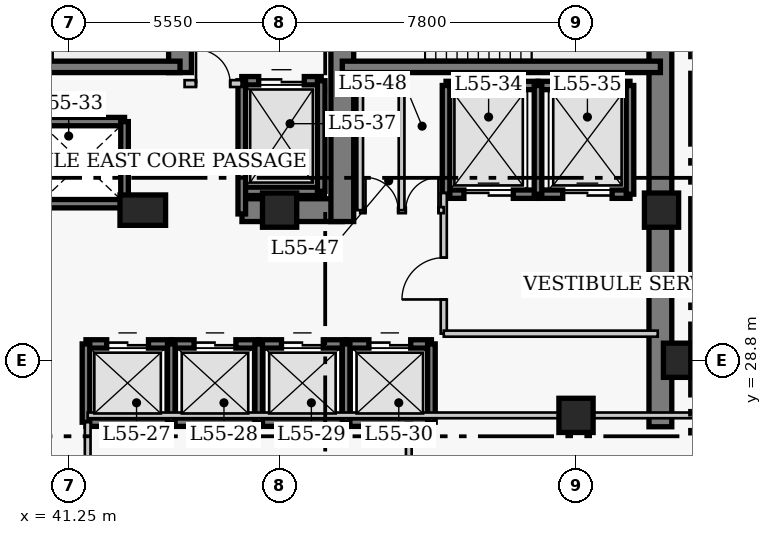
"""IFC4 building model, lengths in metres.
Left out: names, types, materials, properties, quantities, classifications, styles, units other than length and angle.
Written with IfcOpenShell. Run it as: python <this file> out.ifc"""

import sys

from ifc_helpers import new_model, si_unit, direction, frame, frame_2d, origin, origin_2d, place, context, subcontext, project, spatial, rectangle, extrude, element, fill, save


model = new_model("IFC4")
c1 = context("Model", 3, precision=1e-05, world=origin(), true_north=direction((0.0, 1.0)))
c2 = subcontext(c1, "Body", "Model", "MODEL_VIEW")
j1 = project(units=[si_unit("LENGTHUNIT", "METRE"), si_unit("PLANEANGLEUNIT", "RADIAN")], contexts=[c1])
p1 = place(None, origin())
s1 = spatial("IfcSite", under=j1, at=p1, CompositionType="ELEMENT")
p2 = place(p1, origin())
s2 = spatial("IfcBuilding", under=s1, at=p2, CompositionType="ELEMENT")
p3 = place(p2, frame((0.0, 0.0, 220.2)))
s3 = spatial("IfcBuildingStorey", under=s2, at=p3, CompositionType="ELEMENT", Elevation=220.2)
p4 = place(p3, frame((56.82, 27.05, 0.0), z_axis=(0.0, 0.0, 1.0), x_axis=(0.0, 1.0, 0.0)))
e1 = element("IfcWall", 1, at=p4, inside=s3, PredefinedType="SHEAR", context=c2, shape_type="SweptSolid", body=[
    extrude(rectangle(XDim=13.57, YDim=0.6, at=frame_2d((6.785, 0.0))), origin(), (0.0, 0.0, 1.0), 3.9),
])
p5 = place(p3, frame((45.81, 32.75, 0.0), z_axis=(0.0, 0.0, 1.0), x_axis=(1.0, 0.0, 0.0)))
e2 = element("IfcWall", 2, at=p5, inside=s3, PredefinedType="SHEAR", context=c2, shape_type="SweptSolid", body=[
    extrude(rectangle(XDim=2.64, YDim=0.6, at=frame_2d((1.32, 0.0))), origin(), (0.0, 0.0, 1.0), 3.9),
])
p6 = place(p3, frame((44.18, 36.37, 0.0), z_axis=(0.0, 0.0, 1.0), x_axis=(0.0, 1.0, 0.0)))
e3 = element("IfcWall", 3, at=p6, inside=s3, PredefinedType="SHEAR", context=c2, shape_type="SweptSolid", body=[
    extrude(rectangle(XDim=3.95, YDim=0.6, at=frame_2d((1.975, 0.0))), origin(), (0.0, 0.0, 1.0), 3.9),
])
p7 = place(p3, frame((48.45, 32.45, 0.0), z_axis=(0.0, 0.0, 1.0), x_axis=(0.0, 1.0, 0.0)))
e4 = element("IfcWall", 4, at=p7, inside=s3, PredefinedType="SHEAR", context=c2, shape_type="SweptSolid", body=[
    extrude(rectangle(XDim=7.87, YDim=0.6, at=frame_2d((3.935, 0.0))), origin(), (0.0, 0.0, 1.0), 3.9),
])
p8 = place(p7, frame((5.75, 0.0, 0.0)))
e5 = element("IfcOpeningElement", 5, at=p8, cuts=e4, PredefinedType="OPENING", context=c2, shape_type="SweptSolid", body=[
    extrude(rectangle(XDim=1.1, YDim=2.15, at=frame_2d((0.55, 1.075))), frame((0.0, 0.31, 0.0), z_axis=(0.0, -1.0, 0.0), x_axis=(1.0, 0.0, 0.0)), (0.0, 0.0, 1.0), 0.62),
])
p9 = place(p3, frame((35.85, 36.52, 0.0), z_axis=(0.0, 0.0, 1.0), x_axis=(1.0, 0.0, 0.0)))
e6 = element("IfcWall", 6, at=p9, inside=s3, PredefinedType="SHEAR", context=c2, shape_type="SweptSolid", body=[
    extrude(rectangle(XDim=8.33, YDim=0.3, at=frame_2d((4.165, 0.0))), origin(), (0.0, 0.0, 1.0), 3.9),
])
p10 = place(p3, frame((48.45, 36.52, 0.0), z_axis=(0.0, 0.0, 1.0), x_axis=(1.0, 0.0, 0.0)))
e7 = element("IfcWall", 7, at=p10, inside=s3, PredefinedType="SHEAR", context=c2, shape_type="SweptSolid", body=[
    extrude(rectangle(XDim=8.37, YDim=0.3, at=frame_2d((4.185, 0.0))), origin(), (0.0, 0.0, 1.0), 3.9),
])
p11 = place(p3, frame((57.35, 28.8, 0.0), z_axis=(0.0, 0.0, 1.0), x_axis=(1.0, 0.0, 0.0)))
e8 = element("IfcColumn", 8, at=p11, inside=s3, PredefinedType="COLUMN", context=c2, shape_type="SweptSolid", body=[
    extrude(rectangle(XDim=0.9, YDim=0.9, at=origin_2d()), origin(), (0.0, 0.0, 1.0), 3.9),
])
p12 = place(p3, frame((43.2, 32.75, 0.0), z_axis=(0.0, 0.0, 1.0), x_axis=(1.0, 0.0, 0.0)))
e9 = element("IfcColumn", 9, at=p12, inside=s3, PredefinedType="COLUMN", context=c2, shape_type="SweptSolid", body=[
    extrude(rectangle(XDim=1.2, YDim=0.8, at=origin_2d()), origin(), (0.0, 0.0, 1.0), 3.9),
])
for number, where, z_axis, x_axis in (
    (10, (46.8, 32.75, 0.0), (0.0, 0.0, 1.0), (1.0, 0.0, 0.0)),
    (11, (54.6, 27.35, 0.0), (0.0, 0.0, 1.0), (1.0, 0.0, 0.0)),
    (12, (56.85, 32.75, 0.0), (0.0, 0.0, 1.0), (1.0, 0.0, 0.0)),
):
    element("IfcColumn", number, at=place(p3, frame(where, z_axis=z_axis, x_axis=x_axis)), inside=s3, PredefinedType="COLUMN", context=c2, shape_type="SweptSolid", body=[
        extrude(rectangle(XDim=0.9, YDim=0.9, at=origin_2d()), origin(), (0.0, 0.0, 1.0), 3.9),
    ])
p13 = place(p3, frame((41.705, 29.23, 0.0), z_axis=(0.0, 0.0, 1.0), x_axis=(1.0, 0.0, 0.0)))
e13 = element("IfcWall", 13, at=p13, inside=s3, PredefinedType="SHEAR", context=c2, shape_type="SweptSolid", body=[
    extrude(rectangle(XDim=2.245, YDim=0.22, at=frame_2d((1.123, 0.0))), origin(), (0.0, 0.0, 1.0), 3.9),
])
p14 = place(p13, frame((0.545, 0.0, 0.0)))
e14 = element("IfcOpeningElement", 14, at=p14, cuts=e13, PredefinedType="OPENING", context=c2, shape_type="SweptSolid", body=[
    extrude(rectangle(XDim=1.1, YDim=2.15, at=frame_2d((0.55, 1.075))), frame((0.0, 0.12, 0.0), z_axis=(0.0, -1.0, 0.0), x_axis=(1.0, 0.0, 0.0)), (0.0, 0.0, 1.0), 0.24),
])
p15 = place(p3, frame((41.705, 27.17, 0.0), z_axis=(0.0, 0.0, 1.0), x_axis=(1.0, 0.0, 0.0)))
e15 = element("IfcWall", 15, at=p15, inside=s3, PredefinedType="SHEAR", context=c2, shape_type="SweptSolid", body=[
    extrude(rectangle(XDim=2.245, YDim=0.22, at=frame_2d((1.123, 0.0))), origin(), (0.0, 0.0, 1.0), 3.9),
])
p16 = place(p3, frame((41.705, 27.17, 0.0), z_axis=(0.0, 0.0, 1.0), x_axis=(0.0, 1.0, 0.0)))
e16 = element("IfcWall", 16, at=p16, inside=s3, PredefinedType="SHEAR", context=c2, shape_type="SweptSolid", body=[
    extrude(rectangle(XDim=2.06, YDim=0.2, at=frame_2d((1.03, 0.0))), origin(), (0.0, 0.0, 1.0), 3.9),
])
p17 = place(p3, frame((43.95, 29.23, 0.0), z_axis=(0.0, 0.0, 1.0), x_axis=(1.0, 0.0, 0.0)))
e17 = element("IfcWall", 17, at=p17, inside=s3, PredefinedType="SHEAR", context=c2, shape_type="SweptSolid", body=[
    extrude(rectangle(XDim=2.3, YDim=0.22, at=frame_2d((1.15, 0.0))), origin(), (0.0, 0.0, 1.0), 3.9),
])
p18 = place(p17, frame((0.6, 0.0, 0.0)))
e18 = element("IfcOpeningElement", 18, at=p18, cuts=e17, PredefinedType="OPENING", context=c2, shape_type="SweptSolid", body=[
    extrude(rectangle(XDim=1.1, YDim=2.15, at=frame_2d((0.55, 1.075))), frame((0.0, 0.12, 0.0), z_axis=(0.0, -1.0, 0.0), x_axis=(1.0, 0.0, 0.0)), (0.0, 0.0, 1.0), 0.24),
])
p19 = place(p3, frame((43.95, 27.17, 0.0), z_axis=(0.0, 0.0, 1.0), x_axis=(1.0, 0.0, 0.0)))
e19 = element("IfcWall", 19, at=p19, inside=s3, PredefinedType="SHEAR", context=c2, shape_type="SweptSolid", body=[
    extrude(rectangle(XDim=2.3, YDim=0.22, at=frame_2d((1.15, 0.0))), origin(), (0.0, 0.0, 1.0), 3.9),
])
p20 = place(p3, frame((43.95, 27.17, 0.0), z_axis=(0.0, 0.0, 1.0), x_axis=(0.0, 1.0, 0.0)))
e20 = element("IfcWall", 20, at=p20, inside=s3, PredefinedType="SHEAR", context=c2, shape_type="SweptSolid", body=[
    extrude(rectangle(XDim=2.06, YDim=0.2, at=frame_2d((1.03, 0.0))), origin(), (0.0, 0.0, 1.0), 3.9),
])
p21 = place(p3, frame((46.25, 29.23, 0.0), z_axis=(0.0, 0.0, 1.0), x_axis=(1.0, 0.0, 0.0)))
e21 = element("IfcWall", 21, at=p21, inside=s3, PredefinedType="SHEAR", context=c2, shape_type="SweptSolid", body=[
    extrude(rectangle(XDim=2.3, YDim=0.22, at=frame_2d((1.15, 0.0))), origin(), (0.0, 0.0, 1.0), 3.9),
])
p22 = place(p21, frame((0.6, 0.0, 0.0)))
e22 = element("IfcOpeningElement", 22, at=p22, cuts=e21, PredefinedType="OPENING", context=c2, shape_type="SweptSolid", body=[
    extrude(rectangle(XDim=1.1, YDim=2.15, at=frame_2d((0.55, 1.075))), frame((0.0, 0.12, 0.0), z_axis=(0.0, -1.0, 0.0), x_axis=(1.0, 0.0, 0.0)), (0.0, 0.0, 1.0), 0.24),
])
p23 = place(p3, frame((46.25, 27.17, 0.0), z_axis=(0.0, 0.0, 1.0), x_axis=(1.0, 0.0, 0.0)))
e23 = element("IfcWall", 23, at=p23, inside=s3, PredefinedType="SHEAR", context=c2, shape_type="SweptSolid", body=[
    extrude(rectangle(XDim=2.3, YDim=0.22, at=frame_2d((1.15, 0.0))), origin(), (0.0, 0.0, 1.0), 3.9),
])
p24 = place(p3, frame((46.25, 27.17, 0.0), z_axis=(0.0, 0.0, 1.0), x_axis=(0.0, 1.0, 0.0)))
e24 = element("IfcWall", 24, at=p24, inside=s3, PredefinedType="SHEAR", context=c2, shape_type="SweptSolid", body=[
    extrude(rectangle(XDim=2.06, YDim=0.2, at=frame_2d((1.03, 0.0))), origin(), (0.0, 0.0, 1.0), 3.9),
])
p25 = place(p3, frame((48.55, 29.23, 0.0), z_axis=(0.0, 0.0, 1.0), x_axis=(1.0, 0.0, 0.0)))
e25 = element("IfcWall", 25, at=p25, inside=s3, PredefinedType="SHEAR", context=c2, shape_type="SweptSolid", body=[
    extrude(rectangle(XDim=2.245, YDim=0.22, at=frame_2d((1.123, 0.0))), origin(), (0.0, 0.0, 1.0), 3.9),
])
p26 = place(p25, frame((0.6, 0.0, 0.0)))
e26 = element("IfcOpeningElement", 26, at=p26, cuts=e25, PredefinedType="OPENING", context=c2, shape_type="SweptSolid", body=[
    extrude(rectangle(XDim=1.1, YDim=2.15, at=frame_2d((0.55, 1.075))), frame((0.0, 0.12, 0.0), z_axis=(0.0, -1.0, 0.0), x_axis=(1.0, 0.0, 0.0)), (0.0, 0.0, 1.0), 0.24),
])
p27 = place(p3, frame((48.55, 27.17, 0.0), z_axis=(0.0, 0.0, 1.0), x_axis=(1.0, 0.0, 0.0)))
e27 = element("IfcWall", 27, at=p27, inside=s3, PredefinedType="SHEAR", context=c2, shape_type="SweptSolid", body=[
    extrude(rectangle(XDim=2.245, YDim=0.22, at=frame_2d((1.123, 0.0))), origin(), (0.0, 0.0, 1.0), 3.9),
])
for number, where, z_axis, x_axis in (
    (28, (48.55, 27.17, 0.0), (0.0, 0.0, 1.0), (0.0, 1.0, 0.0)),
    (29, (50.795, 27.17, 0.0), (0.0, 0.0, 1.0), (0.0, 1.0, 0.0)),
):
    element("IfcWall", number, at=place(p3, frame(where, z_axis=z_axis, x_axis=x_axis)), inside=s3, PredefinedType="SHEAR", context=c2, shape_type="SweptSolid", body=[
        extrude(rectangle(XDim=2.06, YDim=0.2, at=frame_2d((1.03, 0.0))), origin(), (0.0, 0.0, 1.0), 3.9),
    ])
for number, where, z_axis, x_axis in (
    (30, (40.4, 35.08, 0.0), (0.0, 0.0, 1.0), (1.0, 0.0, 0.0)),
    (31, (40.4, 32.92, 0.0), (0.0, 0.0, 1.0), (1.0, 0.0, 0.0)),
):
    element("IfcWall", number, at=place(p3, frame(where, z_axis=z_axis, x_axis=x_axis)), inside=s3, PredefinedType="SHEAR", context=c2, shape_type="SweptSolid", body=[
        extrude(rectangle(XDim=2.32, YDim=0.22, at=frame_2d((1.16, 0.0))), origin(), (0.0, 0.0, 1.0), 3.9),
    ])
p28 = place(p3, frame((42.72, 32.92, 0.0), z_axis=(0.0, 0.0, 1.0), x_axis=(0.0, 1.0, 0.0)))
e32 = element("IfcWall", 32, at=p28, inside=s3, PredefinedType="SHEAR", context=c2, shape_type="SweptSolid", body=[
    extrude(rectangle(XDim=2.16, YDim=0.2, at=frame_2d((1.08, 0.0))), origin(), (0.0, 0.0, 1.0), 3.9),
])
p29 = place(p3, frame((51.18, 36.03, 0.0), z_axis=(0.0, 0.0, 1.0), x_axis=(1.0, 0.0, 0.0)))
e33 = element("IfcWall", 33, at=p29, inside=s3, PredefinedType="SHEAR", context=c2, shape_type="SweptSolid", body=[
    extrude(rectangle(XDim=2.42, YDim=0.22, at=frame_2d((1.21, 0.0))), origin(), (0.0, 0.0, 1.0), 3.9),
])
p30 = place(p3, frame((51.18, 33.17, 0.0), z_axis=(0.0, 0.0, 1.0), x_axis=(1.0, 0.0, 0.0)))
e34 = element("IfcWall", 34, at=p30, inside=s3, PredefinedType="SHEAR", context=c2, shape_type="SweptSolid", body=[
    extrude(rectangle(XDim=2.42, YDim=0.22, at=frame_2d((1.21, 0.0))), origin(), (0.0, 0.0, 1.0), 3.9),
])
p31 = place(p30, frame((0.47, 0.0, 0.0)))
e35 = element("IfcOpeningElement", 35, at=p31, cuts=e34, PredefinedType="OPENING", context=c2, shape_type="SweptSolid", body=[
    extrude(rectangle(XDim=1.3, YDim=2.15, at=frame_2d((0.65, 1.075))), frame((0.0, 0.12, 0.0), z_axis=(0.0, -1.0, 0.0), x_axis=(1.0, 0.0, 0.0)), (0.0, 0.0, 1.0), 0.24),
])
p32 = place(p3, frame((51.18, 33.17, 0.0), z_axis=(0.0, 0.0, 1.0), x_axis=(0.0, 1.0, 0.0)))
e36 = element("IfcWall", 36, at=p32, inside=s3, PredefinedType="SHEAR", context=c2, shape_type="SweptSolid", body=[
    extrude(rectangle(XDim=2.86, YDim=0.2, at=frame_2d((1.43, 0.0))), origin(), (0.0, 0.0, 1.0), 3.9),
])
p33 = place(p3, frame((53.6, 36.03, 0.0), z_axis=(0.0, 0.0, 1.0), x_axis=(1.0, 0.0, 0.0)))
e37 = element("IfcWall", 37, at=p33, inside=s3, PredefinedType="SHEAR", context=c2, shape_type="SweptSolid", body=[
    extrude(rectangle(XDim=2.42, YDim=0.22, at=frame_2d((1.21, 0.0))), origin(), (0.0, 0.0, 1.0), 3.9),
])
p34 = place(p3, frame((53.6, 33.17, 0.0), z_axis=(0.0, 0.0, 1.0), x_axis=(1.0, 0.0, 0.0)))
e38 = element("IfcWall", 38, at=p34, inside=s3, PredefinedType="SHEAR", context=c2, shape_type="SweptSolid", body=[
    extrude(rectangle(XDim=2.42, YDim=0.22, at=frame_2d((1.21, 0.0))), origin(), (0.0, 0.0, 1.0), 3.9),
])
p35 = place(p34, frame((0.65, 0.0, 0.0)))
e39 = element("IfcOpeningElement", 39, at=p35, cuts=e38, PredefinedType="OPENING", context=c2, shape_type="SweptSolid", body=[
    extrude(rectangle(XDim=1.3, YDim=2.15, at=frame_2d((0.65, 1.075))), frame((0.0, 0.12, 0.0), z_axis=(0.0, -1.0, 0.0), x_axis=(1.0, 0.0, 0.0)), (0.0, 0.0, 1.0), 0.24),
])
for number, where, z_axis, x_axis in (
    (40, (53.6, 33.17, 0.0), (0.0, 0.0, 1.0), (0.0, 1.0, 0.0)),
    (41, (56.02, 33.17, 0.0), (0.0, 0.0, 1.0), (0.0, 1.0, 0.0)),
):
    element("IfcWall", number, at=place(p3, frame(where, z_axis=z_axis, x_axis=x_axis)), inside=s3, PredefinedType="SHEAR", context=c2, shape_type="SweptSolid", body=[
        extrude(rectangle(XDim=2.86, YDim=0.2, at=frame_2d((1.43, 0.0))), origin(), (0.0, 0.0, 1.0), 3.9),
    ])
p36 = place(p3, frame((45.805, 36.155, 0.0), z_axis=(0.0, 0.0, 1.0), x_axis=(1.0, 0.0, 0.0)))
e42 = element("IfcWall", 42, at=p36, inside=s3, PredefinedType="SHEAR", context=c2, shape_type="SweptSolid", body=[
    extrude(rectangle(XDim=2.09, YDim=0.22, at=frame_2d((1.045, 0.0))), origin(), (0.0, 0.0, 1.0), 3.9),
])
p37 = place(p36, frame((0.445, 0.0, 0.0)))
e43 = element("IfcOpeningElement", 43, at=p37, cuts=e42, PredefinedType="OPENING", context=c2, shape_type="SweptSolid", body=[
    extrude(rectangle(XDim=1.2, YDim=2.15, at=frame_2d((0.6, 1.075))), frame((0.0, 0.12, 0.0), z_axis=(0.0, -1.0, 0.0), x_axis=(1.0, 0.0, 0.0)), (0.0, 0.0, 1.0), 0.24),
])
p38 = place(p3, frame((45.805, 33.245, 0.0), z_axis=(0.0, 0.0, 1.0), x_axis=(1.0, 0.0, 0.0)))
e44 = element("IfcWall", 44, at=p38, inside=s3, PredefinedType="SHEAR", context=c2, shape_type="SweptSolid", body=[
    extrude(rectangle(XDim=2.09, YDim=0.22, at=frame_2d((1.045, 0.0))), origin(), (0.0, 0.0, 1.0), 3.9),
])
p39 = place(p3, frame((45.805, 32.65, 0.0), z_axis=(0.0, 0.0, 1.0), x_axis=(0.0, 1.0, 0.0)))
e45 = element("IfcWall", 45, at=p39, inside=s3, PredefinedType="SHEAR", context=c2, shape_type="SweptSolid", body=[
    extrude(rectangle(XDim=3.505, YDim=0.2, at=frame_2d((1.752, 0.0))), origin(), (0.0, 0.0, 1.0), 3.9),
])
p40 = place(p3, frame((47.895, 33.245, 0.0), z_axis=(0.0, 0.0, 1.0), x_axis=(0.0, 1.0, 0.0)))
e46 = element("IfcWall", 46, at=p40, inside=s3, PredefinedType="SHEAR", context=c2, shape_type="SweptSolid", body=[
    extrude(rectangle(XDim=2.91, YDim=0.2, at=frame_2d((1.455, 0.0))), origin(), (0.0, 0.0, 1.0), 3.9),
])
p41 = place(p3, frame((44.3, 36.08, 0.0), z_axis=(0.0, 0.0, 1.0), x_axis=(1.0, 0.0, 0.0)))
e47 = element("IfcWall", 47, at=p41, inside=s3, PredefinedType="PARTITIONING", context=c2, shape_type="SweptSolid", body=[
    extrude(rectangle(XDim=1.5, YDim=0.18, at=frame_2d((0.75, 0.0))), origin(), (0.0, 0.0, 1.0), 3.65),
])
p42 = place(p41, frame((0.3, 0.0, 0.0)))
e48 = element("IfcOpeningElement", 48, at=p42, cuts=e47, PredefinedType="OPENING", context=c2, shape_type="SweptSolid", body=[
    extrude(rectangle(XDim=0.9, YDim=2.15, at=frame_2d((0.45, 1.075))), frame((0.0, 0.1, 0.0), z_axis=(0.0, -1.0, 0.0), x_axis=(1.0, 0.0, 0.0)), (0.0, 0.0, 1.0), 0.2),
])
p43 = place(p3, frame((51.12, 29.5, 0.0), z_axis=(0.0, 0.0, 1.0), x_axis=(0.0, 1.0, 0.0)))
e49 = element("IfcWall", 49, at=p43, inside=s3, PredefinedType="PARTITIONING", context=c2, shape_type="SweptSolid", body=[
    extrude(rectangle(XDim=3.7, YDim=0.16, at=frame_2d((1.85, 0.0))), origin(), (0.0, 0.0, 1.0), 3.65),
])
p44 = place(p43, frame((0.9, 0.0, 0.0)))
e50 = element("IfcOpeningElement", 50, at=p44, cuts=e49, PredefinedType="OPENING", context=c2, shape_type="SweptSolid", body=[
    extrude(rectangle(XDim=1.1, YDim=2.15, at=frame_2d((0.55, 1.075))), frame((0.0, 0.09, 0.0), z_axis=(0.0, -1.0, 0.0), x_axis=(1.0, 0.0, 0.0)), (0.0, 0.0, 1.0), 0.18),
])
p45 = place(p3, frame((51.12, 29.5, 0.0), z_axis=(0.0, 0.0, 1.0), x_axis=(1.0, 0.0, 0.0)))
e51 = element("IfcWall", 51, at=p45, inside=s3, PredefinedType="PARTITIONING", context=c2, shape_type="SweptSolid", body=[
    extrude(rectangle(XDim=5.63, YDim=0.16, at=frame_2d((2.815, 0.0))), origin(), (0.0, 0.0, 1.0), 3.65),
])
p46 = place(p3, frame((48.92, 32.75, 0.0), z_axis=(0.0, 0.0, 1.0), x_axis=(1.0, 0.0, 0.0)))
e52 = element("IfcWall", 52, at=p46, inside=s3, PredefinedType="PARTITIONING", context=c2, shape_type="SweptSolid", body=[
    extrude(rectangle(XDim=2.2, YDim=0.16, at=frame_2d((1.1, 0.0))), origin(), (0.0, 0.0, 1.0), 3.65),
])
p47 = place(p46, frame((0.14, 0.0, 0.0)))
e53 = element("IfcOpeningElement", 53, at=p47, cuts=e52, PredefinedType="OPENING", context=c2, shape_type="SweptSolid", body=[
    extrude(rectangle(XDim=0.86, YDim=2.05, at=frame_2d((0.43, 1.025))), frame((0.0, 0.09, 0.0), z_axis=(0.0, -1.0, 0.0), x_axis=(1.0, 0.0, 0.0)), (0.0, 0.0, 1.0), 0.18),
])
p48 = place(p46, frame((1.2, 0.0, 0.0)))
e54 = element("IfcOpeningElement", 54, at=p48, cuts=e52, PredefinedType="OPENING", context=c2, shape_type="SweptSolid", body=[
    extrude(rectangle(XDim=0.86, YDim=2.05, at=frame_2d((0.43, 1.025))), frame((0.0, 0.09, 0.0), z_axis=(0.0, -1.0, 0.0), x_axis=(1.0, 0.0, 0.0)), (0.0, 0.0, 1.0), 0.18),
])
for number, where, z_axis, x_axis in (
    (55, (48.92, 32.75, 0.0), (0.0, 0.0, 1.0), (0.0, 1.0, 0.0)),
    (56, (50.01, 32.75, 0.0), (0.0, 0.0, 1.0), (0.0, 1.0, 0.0)),
):
    element("IfcWall", number, at=place(p3, frame(where, z_axis=z_axis, x_axis=x_axis)), inside=s3, PredefinedType="PARTITIONING", context=c2, shape_type="SweptSolid", body=[
        extrude(rectangle(XDim=3.62, YDim=0.15, at=frame_2d((1.81, 0.0))), origin(), (0.0, 0.0, 1.0), 3.65),
    ])
p49 = place(p3, frame((41.75, 16.86, 0.0), z_axis=(0.0, 0.0, 1.0), x_axis=(0.0, 1.0, 0.0)))
e57 = element("IfcWall", 57, at=p49, inside=s3, PredefinedType="PARTITIONING", context=c2, shape_type="SweptSolid", body=[
    extrude(rectangle(XDim=10.31, YDim=0.15, at=frame_2d((5.155, 0.0))), origin(), (0.0, 0.0, 1.0), 3.65),
])
p50 = place(p3, frame((50.2, 16.86, 0.0), z_axis=(0.0, 0.0, 1.0), x_axis=(0.0, 1.0, 0.0)))
e58 = element("IfcWall", 58, at=p50, inside=s3, PredefinedType="PARTITIONING", context=c2, shape_type="SweptSolid", body=[
    extrude(rectangle(XDim=10.29, YDim=0.15, at=frame_2d((5.145, 0.0))), origin(), (0.0, 0.0, 1.0), 3.65),
])
p51 = place(p3, frame((41.75, 27.35, 0.0), z_axis=(0.0, 0.0, 1.0), x_axis=(1.0, 0.0, 0.0)))
e59 = element("IfcWall", 59, at=p51, inside=s3, PredefinedType="PARTITIONING", context=c2, shape_type="SweptSolid", body=[
    extrude(rectangle(XDim=16.84, YDim=0.15, at=frame_2d((8.42, 0.0))), origin(), (0.0, 0.0, 1.0), 3.65),
])
p52 = place(p14, origin())
e60 = element("IfcDoor", 60, at=p52, inside=s3, OperationType="DOUBLE_DOOR_SLIDING", PredefinedType="DOOR", context=c2, shape_type="SweptSolid", body=[
    extrude(rectangle(XDim=1.1, YDim=2.15, at=frame_2d((0.55, 1.075))), frame((0.0, 0.025, 0.0), z_axis=(0.0, -1.0, 0.0), x_axis=(1.0, 0.0, 0.0)), (0.0, 0.0, 1.0), 0.05),
])
fill(e14, e60)
p53 = place(p18, origin())
e61 = element("IfcDoor", 61, at=p53, inside=s3, OperationType="DOUBLE_DOOR_SLIDING", PredefinedType="DOOR", context=c2, shape_type="SweptSolid", body=[
    extrude(rectangle(XDim=1.1, YDim=2.15, at=frame_2d((0.55, 1.075))), frame((0.0, 0.025, 0.0), z_axis=(0.0, -1.0, 0.0), x_axis=(1.0, 0.0, 0.0)), (0.0, 0.0, 1.0), 0.05),
])
fill(e18, e61)
p54 = place(p22, origin())
e62 = element("IfcDoor", 62, at=p54, inside=s3, OperationType="DOUBLE_DOOR_SLIDING", PredefinedType="DOOR", context=c2, shape_type="SweptSolid", body=[
    extrude(rectangle(XDim=1.1, YDim=2.15, at=frame_2d((0.55, 1.075))), frame((0.0, 0.025, 0.0), z_axis=(0.0, -1.0, 0.0), x_axis=(1.0, 0.0, 0.0)), (0.0, 0.0, 1.0), 0.05),
])
fill(e22, e62)
p55 = place(p26, origin())
e63 = element("IfcDoor", 63, at=p55, inside=s3, OperationType="DOUBLE_DOOR_SLIDING", PredefinedType="DOOR", context=c2, shape_type="SweptSolid", body=[
    extrude(rectangle(XDim=1.1, YDim=2.15, at=frame_2d((0.55, 1.075))), frame((0.0, 0.025, 0.0), z_axis=(0.0, -1.0, 0.0), x_axis=(1.0, 0.0, 0.0)), (0.0, 0.0, 1.0), 0.05),
])
fill(e26, e63)
p56 = place(p31, origin())
e64 = element("IfcDoor", 64, at=p56, inside=s3, OperationType="DOUBLE_DOOR_SLIDING", PredefinedType="DOOR", context=c2, shape_type="SweptSolid", body=[
    extrude(rectangle(XDim=1.3, YDim=2.15, at=frame_2d((0.65, 1.075))), frame((0.0, 0.025, 0.0), z_axis=(0.0, -1.0, 0.0), x_axis=(1.0, 0.0, 0.0)), (0.0, 0.0, 1.0), 0.05),
])
fill(e35, e64)
p57 = place(p35, origin())
e65 = element("IfcDoor", 65, at=p57, inside=s3, OperationType="DOUBLE_DOOR_SLIDING", PredefinedType="DOOR", context=c2, shape_type="SweptSolid", body=[
    extrude(rectangle(XDim=1.3, YDim=2.15, at=frame_2d((0.65, 1.075))), frame((0.0, 0.025, 0.0), z_axis=(0.0, -1.0, 0.0), x_axis=(1.0, 0.0, 0.0)), (0.0, 0.0, 1.0), 0.05),
])
fill(e39, e65)
p58 = place(p37, origin())
e66 = element("IfcDoor", 66, at=p58, inside=s3, OperationType="DOUBLE_DOOR_SLIDING", PredefinedType="DOOR", context=c2, shape_type="SweptSolid", body=[
    extrude(rectangle(XDim=1.2, YDim=2.15, at=frame_2d((0.6, 1.075))), frame((0.0, 0.025, 0.0), z_axis=(0.0, -1.0, 0.0), x_axis=(1.0, 0.0, 0.0)), (0.0, 0.0, 1.0), 0.05),
])
fill(e43, e66)
p59 = place(p42, origin())
e67 = element("IfcDoor", 67, at=p59, inside=s3, OperationType="SINGLE_SWING_LEFT", PredefinedType="DOOR", context=c2, shape_type="SweptSolid", body=[
    extrude(rectangle(XDim=0.9, YDim=2.15, at=frame_2d((0.45, 1.075))), frame((0.0, 0.025, 0.0), z_axis=(0.0, -1.0, 0.0), x_axis=(1.0, 0.0, 0.0)), (0.0, 0.0, 1.0), 0.05),
])
fill(e48, e67)
p60 = place(p44, origin())
e68 = element("IfcDoor", 68, at=p60, inside=s3, OperationType="SINGLE_SWING_LEFT", PredefinedType="DOOR", context=c2, shape_type="SweptSolid", body=[
    extrude(rectangle(XDim=1.1, YDim=2.15, at=frame_2d((0.55, 1.075))), frame((0.0, 0.025, 0.0), z_axis=(0.0, -1.0, 0.0), x_axis=(1.0, 0.0, 0.0)), (0.0, 0.0, 1.0), 0.05),
])
fill(e50, e68)
p61 = place(p47, origin())
e69 = element("IfcDoor", 69, at=p61, inside=s3, OperationType="SINGLE_SWING_LEFT", PredefinedType="DOOR", context=c2, shape_type="SweptSolid", body=[
    extrude(rectangle(XDim=0.86, YDim=2.05, at=frame_2d((0.43, 1.025))), frame((0.0, 0.025, 0.0), z_axis=(0.0, -1.0, 0.0), x_axis=(1.0, 0.0, 0.0)), (0.0, 0.0, 1.0), 0.05),
])
fill(e53, e69)
p62 = place(p48, origin())
e70 = element("IfcDoor", 70, at=p62, inside=s3, OperationType="SINGLE_SWING_RIGHT", PredefinedType="DOOR", context=c2, shape_type="SweptSolid", body=[
    extrude(rectangle(XDim=0.86, YDim=2.05, at=frame_2d((0.43, 1.025))), frame((0.0, 0.025, 0.0), z_axis=(0.0, -1.0, 0.0), x_axis=(1.0, 0.0, 0.0)), (0.0, 0.0, 1.0), 0.05),
])
fill(e54, e70)
save(model, sys.argv[1])
